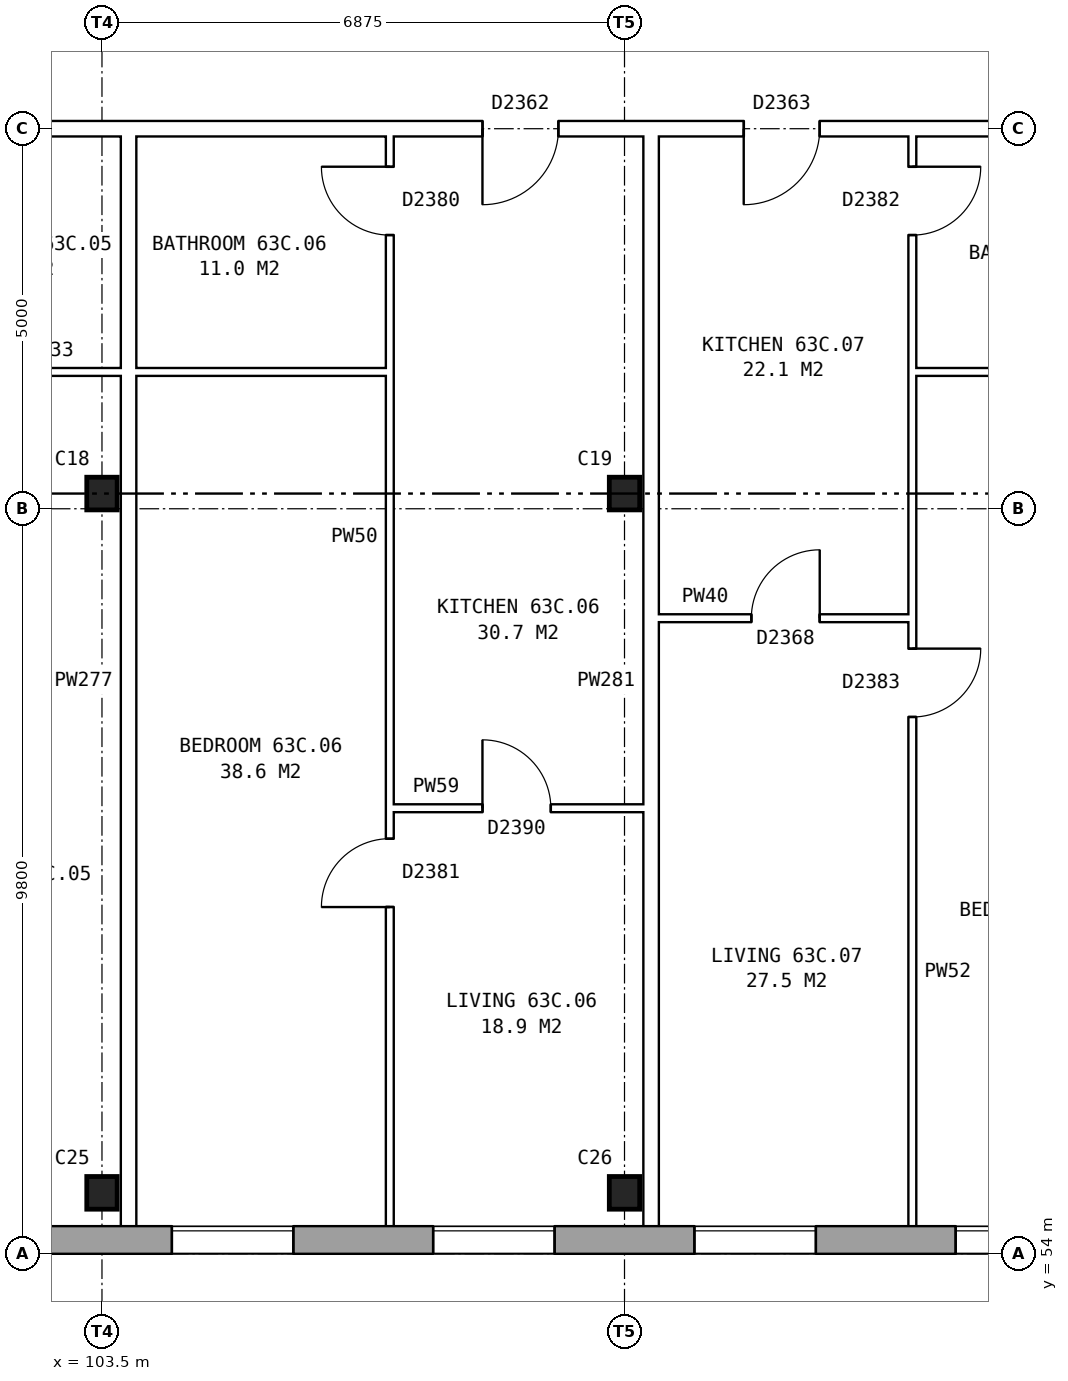
"""IFC4 building model, lengths in metres.
Left out: names, types, materials, properties, quantities, classifications, styles, units other than length and angle.
Written with IfcOpenShell. Run it as: python <this file> out.ifc"""

import sys

from ifc_helpers import new_model, si_unit, direction, frame, frame_2d, origin, origin_2d, place, context, subcontext, project, spatial, rectangle, i_section, extrude, element, fill, save


model = new_model("IFC4")
c1 = context("Model", 3, precision=1e-05, world=origin(), true_north=direction((0.0, 1.0)))
c2 = subcontext(c1, "Body", "Model", "MODEL_VIEW")
j1 = project(units=[si_unit("LENGTHUNIT", "METRE"), si_unit("PLANEANGLEUNIT", "RADIAN")], contexts=[c1])
p1 = place(None, origin())
s1 = spatial("IfcSite", under=j1, at=p1, CompositionType="ELEMENT")
p2 = place(p1, origin())
s2 = spatial("IfcBuilding", under=s1, at=p2, CompositionType="ELEMENT")
p3 = place(p2, frame((0.0, 0.0, 224.5)))
s3 = spatial("IfcBuildingStorey", under=s2, at=p3, CompositionType="ELEMENT", Elevation=224.5)
for number, where, z_axis, x_axis in (
    (1, (103.5, 54.8, 0.0), (0.0, 0.0, 1.0), (1.0, 0.0, 0.0)),
    (2, (110.375, 54.8, 0.0), (0.0, 0.0, 1.0), (1.0, 0.0, 0.0)),
    (3, (103.5, 64.0, 0.0), (0.0, 0.0, 1.0), (1.0, 0.0, 0.0)),
    (4, (110.375, 64.0, 0.0), (0.0, 0.0, 1.0), (1.0, 0.0, 0.0)),
):
    element("IfcColumn", number, at=place(p3, frame(where, z_axis=z_axis, x_axis=x_axis)), inside=s3, PredefinedType="COLUMN", context=c2, shape_type="SweptSolid", body=[
        extrude(i_section(OverallWidth=0.4, OverallDepth=0.43, WebThickness=0.04, FlangeThickness=0.04, at=origin_2d()), origin(), (0.0, 0.0, 1.0), 2.85),
    ])
p4 = place(p3, frame((75.95, 54.18, 0.0), z_axis=(0.0, 0.0, 1.0), x_axis=(1.0, 0.0, 0.0)))
e5 = element("IfcWall", 5, at=p4, inside=s3, PredefinedType="STANDARD", context=c2, shape_type="SweptSolid", body=[
    extrude(rectangle(XDim=55.1, YDim=0.36, at=frame_2d((27.55, 0.0))), origin(), (0.0, 0.0, 1.0), 2.85),
])
p5 = place(p4, frame((0.969, 0.0, 0.8)))
e6 = element("IfcOpeningElement", 6, at=p5, cuts=e5, PredefinedType="OPENING", context=c2, shape_type="SweptSolid", body=[
    extrude(rectangle(XDim=1.6, YDim=1.8, at=frame_2d((0.8, 0.9))), frame((0.0, 0.19, 0.0), z_axis=(0.0, -1.0, 0.0), x_axis=(1.0, 0.0, 0.0)), (0.0, 0.0, 1.0), 0.38),
])
p6 = place(p4, frame((4.406, 0.0, 0.8)))
e7 = element("IfcOpeningElement", 7, at=p6, cuts=e5, PredefinedType="OPENING", context=c2, shape_type="SweptSolid", body=[
    extrude(rectangle(XDim=1.6, YDim=1.8, at=frame_2d((0.8, 0.9))), frame((0.0, 0.19, 0.0), z_axis=(0.0, -1.0, 0.0), x_axis=(1.0, 0.0, 0.0)), (0.0, 0.0, 1.0), 0.38),
])
p7 = place(p4, frame((7.844, 0.0, 0.8)))
e8 = element("IfcOpeningElement", 8, at=p7, cuts=e5, PredefinedType="OPENING", context=c2, shape_type="SweptSolid", body=[
    extrude(rectangle(XDim=1.6, YDim=1.8, at=frame_2d((0.8, 0.9))), frame((0.0, 0.19, 0.0), z_axis=(0.0, -1.0, 0.0), x_axis=(1.0, 0.0, 0.0)), (0.0, 0.0, 1.0), 0.38),
])
p8 = place(p4, frame((11.281, 0.0, 0.8)))
e9 = element("IfcOpeningElement", 9, at=p8, cuts=e5, PredefinedType="OPENING", context=c2, shape_type="SweptSolid", body=[
    extrude(rectangle(XDim=1.6, YDim=1.8, at=frame_2d((0.8, 0.9))), frame((0.0, 0.19, 0.0), z_axis=(0.0, -1.0, 0.0), x_axis=(1.0, 0.0, 0.0)), (0.0, 0.0, 1.0), 0.38),
])
p9 = place(p4, frame((14.719, 0.0, 0.8)))
e10 = element("IfcOpeningElement", 10, at=p9, cuts=e5, PredefinedType="OPENING", context=c2, shape_type="SweptSolid", body=[
    extrude(rectangle(XDim=1.6, YDim=1.8, at=frame_2d((0.8, 0.9))), frame((0.0, 0.19, 0.0), z_axis=(0.0, -1.0, 0.0), x_axis=(1.0, 0.0, 0.0)), (0.0, 0.0, 1.0), 0.38),
])
p10 = place(p4, frame((18.156, 0.0, 0.8)))
e11 = element("IfcOpeningElement", 11, at=p10, cuts=e5, PredefinedType="OPENING", context=c2, shape_type="SweptSolid", body=[
    extrude(rectangle(XDim=1.6, YDim=1.8, at=frame_2d((0.8, 0.9))), frame((0.0, 0.19, 0.0), z_axis=(0.0, -1.0, 0.0), x_axis=(1.0, 0.0, 0.0)), (0.0, 0.0, 1.0), 0.38),
])
p11 = place(p4, frame((21.594, 0.0, 0.8)))
e12 = element("IfcOpeningElement", 12, at=p11, cuts=e5, PredefinedType="OPENING", context=c2, shape_type="SweptSolid", body=[
    extrude(rectangle(XDim=1.6, YDim=1.8, at=frame_2d((0.8, 0.9))), frame((0.0, 0.19, 0.0), z_axis=(0.0, -1.0, 0.0), x_axis=(1.0, 0.0, 0.0)), (0.0, 0.0, 1.0), 0.38),
])
p12 = place(p4, frame((25.031, 0.0, 0.8)))
e13 = element("IfcOpeningElement", 13, at=p12, cuts=e5, PredefinedType="OPENING", context=c2, shape_type="SweptSolid", body=[
    extrude(rectangle(XDim=1.6, YDim=1.8, at=frame_2d((0.8, 0.9))), frame((0.0, 0.19, 0.0), z_axis=(0.0, -1.0, 0.0), x_axis=(1.0, 0.0, 0.0)), (0.0, 0.0, 1.0), 0.38),
])
p13 = place(p4, frame((28.469, 0.0, 0.8)))
e14 = element("IfcOpeningElement", 14, at=p13, cuts=e5, PredefinedType="OPENING", context=c2, shape_type="SweptSolid", body=[
    extrude(rectangle(XDim=1.6, YDim=1.8, at=frame_2d((0.8, 0.9))), frame((0.0, 0.19, 0.0), z_axis=(0.0, -1.0, 0.0), x_axis=(1.0, 0.0, 0.0)), (0.0, 0.0, 1.0), 0.38),
])
p14 = place(p4, frame((31.906, 0.0, 0.8)))
e15 = element("IfcOpeningElement", 15, at=p14, cuts=e5, PredefinedType="OPENING", context=c2, shape_type="SweptSolid", body=[
    extrude(rectangle(XDim=1.6, YDim=1.8, at=frame_2d((0.8, 0.9))), frame((0.0, 0.19, 0.0), z_axis=(0.0, -1.0, 0.0), x_axis=(1.0, 0.0, 0.0)), (0.0, 0.0, 1.0), 0.38),
])
p15 = place(p4, frame((35.344, 0.0, 0.8)))
e16 = element("IfcOpeningElement", 16, at=p15, cuts=e5, PredefinedType="OPENING", context=c2, shape_type="SweptSolid", body=[
    extrude(rectangle(XDim=1.6, YDim=1.8, at=frame_2d((0.8, 0.9))), frame((0.0, 0.19, 0.0), z_axis=(0.0, -1.0, 0.0), x_axis=(1.0, 0.0, 0.0)), (0.0, 0.0, 1.0), 0.38),
])
p16 = place(p4, frame((38.781, 0.0, 0.8)))
e17 = element("IfcOpeningElement", 17, at=p16, cuts=e5, PredefinedType="OPENING", context=c2, shape_type="SweptSolid", body=[
    extrude(rectangle(XDim=1.6, YDim=1.8, at=frame_2d((0.8, 0.9))), frame((0.0, 0.19, 0.0), z_axis=(0.0, -1.0, 0.0), x_axis=(1.0, 0.0, 0.0)), (0.0, 0.0, 1.0), 0.38),
])
p17 = place(p4, frame((42.219, 0.0, 0.8)))
e18 = element("IfcOpeningElement", 18, at=p17, cuts=e5, PredefinedType="OPENING", context=c2, shape_type="SweptSolid", body=[
    extrude(rectangle(XDim=1.6, YDim=1.8, at=frame_2d((0.8, 0.9))), frame((0.0, 0.19, 0.0), z_axis=(0.0, -1.0, 0.0), x_axis=(1.0, 0.0, 0.0)), (0.0, 0.0, 1.0), 0.38),
])
p18 = place(p4, frame((45.656, 0.0, 0.8)))
e19 = element("IfcOpeningElement", 19, at=p18, cuts=e5, PredefinedType="OPENING", context=c2, shape_type="SweptSolid", body=[
    extrude(rectangle(XDim=1.6, YDim=1.8, at=frame_2d((0.8, 0.9))), frame((0.0, 0.19, 0.0), z_axis=(0.0, -1.0, 0.0), x_axis=(1.0, 0.0, 0.0)), (0.0, 0.0, 1.0), 0.38),
])
p19 = place(p4, frame((49.094, 0.0, 0.8)))
e20 = element("IfcOpeningElement", 20, at=p19, cuts=e5, PredefinedType="OPENING", context=c2, shape_type="SweptSolid", body=[
    extrude(rectangle(XDim=1.6, YDim=1.8, at=frame_2d((0.8, 0.9))), frame((0.0, 0.19, 0.0), z_axis=(0.0, -1.0, 0.0), x_axis=(1.0, 0.0, 0.0)), (0.0, 0.0, 1.0), 0.38),
])
p20 = place(p4, frame((52.531, 0.0, 0.8)))
e21 = element("IfcOpeningElement", 21, at=p20, cuts=e5, PredefinedType="OPENING", context=c2, shape_type="SweptSolid", body=[
    extrude(rectangle(XDim=1.6, YDim=1.8, at=frame_2d((0.8, 0.9))), frame((0.0, 0.19, 0.0), z_axis=(0.0, -1.0, 0.0), x_axis=(1.0, 0.0, 0.0)), (0.0, 0.0, 1.0), 0.38),
])
p21 = place(p3, frame((107.287, 59.86, 0.0), z_axis=(0.0, 0.0, 1.0), x_axis=(1.0, 0.0, 0.0)))
e22 = element("IfcWall", 22, at=p21, inside=s3, PredefinedType="PARTITIONING", context=c2, shape_type="SweptSolid", body=[
    extrude(rectangle(XDim=3.338, YDim=0.1, at=frame_2d((1.669, 0.0))), origin(), (0.0, 0.0, 1.0), 2.85),
])
p22 = place(p21, frame((1.219, 0.0, 0.0)))
e23 = element("IfcOpeningElement", 23, at=p22, cuts=e22, PredefinedType="OPENING", context=c2, shape_type="SweptSolid", body=[
    extrude(rectangle(XDim=0.9, YDim=2.1, at=frame_2d((0.45, 1.05))), frame((0.0, 0.06, 0.0), z_axis=(0.0, -1.0, 0.0), x_axis=(1.0, 0.0, 0.0)), (0.0, 0.0, 1.0), 0.12),
])
p23 = place(p3, frame((110.825, 62.36, 0.0), z_axis=(0.0, 0.0, 1.0), x_axis=(1.0, 0.0, 0.0)))
e24 = element("IfcWall", 24, at=p23, inside=s3, PredefinedType="PARTITIONING", context=c2, shape_type="SweptSolid", body=[
    extrude(rectangle(XDim=3.337, YDim=0.1, at=frame_2d((1.668, 0.0))), origin(), (0.0, 0.0, 1.0), 2.85),
])
p24 = place(p23, frame((1.219, 0.0, 0.0)))
e25 = element("IfcOpeningElement", 25, at=p24, cuts=e24, PredefinedType="OPENING", context=c2, shape_type="SweptSolid", body=[
    extrude(rectangle(XDim=0.9, YDim=2.1, at=frame_2d((0.45, 1.05))), frame((0.0, 0.06, 0.0), z_axis=(0.0, -1.0, 0.0), x_axis=(1.0, 0.0, 0.0)), (0.0, 0.0, 1.0), 0.12),
])
p25 = place(p3, frame((100.412, 65.6, 0.0), z_axis=(0.0, 0.0, 1.0), x_axis=(1.0, 0.0, 0.0)))
e26 = element("IfcWall", 26, at=p25, inside=s3, PredefinedType="PARTITIONING", context=c2, shape_type="SweptSolid", body=[
    extrude(rectangle(XDim=6.875, YDim=0.1, at=frame_2d((3.438, 0.0))), origin(), (0.0, 0.0, 1.0), 2.85),
])
p26 = place(p3, frame((114.162, 65.6, 0.0), z_axis=(0.0, 0.0, 1.0), x_axis=(1.0, 0.0, 0.0)))
e27 = element("IfcWall", 27, at=p26, inside=s3, PredefinedType="PARTITIONING", context=c2, shape_type="SweptSolid", body=[
    extrude(rectangle(XDim=3.338, YDim=0.1, at=frame_2d((1.669, 0.0))), origin(), (0.0, 0.0, 1.0), 2.85),
])
p27 = place(p3, frame((75.64, 68.8, 0.0), z_axis=(0.0, 0.0, 1.0), x_axis=(1.0, 0.0, 0.0)))
e28 = element("IfcWall", 28, at=p27, inside=s3, PredefinedType="PARTITIONING", context=c2, shape_type="SweptSolid", body=[
    extrude(rectangle(XDim=55.72, YDim=0.2, at=frame_2d((27.86, 0.0))), origin(), (0.0, 0.0, 1.0), 2.85),
])
p28 = place(p27, frame((1.399, 0.0, 0.0)))
e29 = element("IfcOpeningElement", 29, at=p28, cuts=e28, PredefinedType="OPENING", context=c2, shape_type="SweptSolid", body=[
    extrude(rectangle(XDim=1.0, YDim=2.1, at=frame_2d((0.5, 1.05))), frame((0.0, 0.11, 0.0), z_axis=(0.0, -1.0, 0.0), x_axis=(1.0, 0.0, 0.0)), (0.0, 0.0, 1.0), 0.22),
])
p29 = place(p27, frame((12.241, 0.0, 0.0)))
e30 = element("IfcOpeningElement", 30, at=p29, cuts=e28, PredefinedType="OPENING", context=c2, shape_type="SweptSolid", body=[
    extrude(rectangle(XDim=1.0, YDim=2.1, at=frame_2d((0.5, 1.05))), frame((0.0, 0.11, 0.0), z_axis=(0.0, -1.0, 0.0), x_axis=(1.0, 0.0, 0.0)), (0.0, 0.0, 1.0), 0.22),
])
p30 = place(p27, frame((22.553, 0.0, 0.0)))
e31 = element("IfcOpeningElement", 31, at=p30, cuts=e28, PredefinedType="OPENING", context=c2, shape_type="SweptSolid", body=[
    extrude(rectangle(XDim=1.0, YDim=2.1, at=frame_2d((0.5, 1.05))), frame((0.0, 0.11, 0.0), z_axis=(0.0, -1.0, 0.0), x_axis=(1.0, 0.0, 0.0)), (0.0, 0.0, 1.0), 0.22),
])
p31 = place(p27, frame((32.866, 0.0, 0.0)))
e32 = element("IfcOpeningElement", 32, at=p31, cuts=e28, PredefinedType="OPENING", context=c2, shape_type="SweptSolid", body=[
    extrude(rectangle(XDim=1.0, YDim=2.1, at=frame_2d((0.5, 1.05))), frame((0.0, 0.11, 0.0), z_axis=(0.0, -1.0, 0.0), x_axis=(1.0, 0.0, 0.0)), (0.0, 0.0, 1.0), 0.22),
])
p32 = place(p27, frame((36.303, 0.0, 0.0)))
e33 = element("IfcOpeningElement", 33, at=p32, cuts=e28, PredefinedType="OPENING", context=c2, shape_type="SweptSolid", body=[
    extrude(rectangle(XDim=1.0, YDim=2.1, at=frame_2d((0.5, 1.05))), frame((0.0, 0.11, 0.0), z_axis=(0.0, -1.0, 0.0), x_axis=(1.0, 0.0, 0.0)), (0.0, 0.0, 1.0), 0.22),
])
p33 = place(p27, frame((46.616, 0.0, 0.0)))
e34 = element("IfcOpeningElement", 34, at=p33, cuts=e28, PredefinedType="OPENING", context=c2, shape_type="SweptSolid", body=[
    extrude(rectangle(XDim=1.0, YDim=2.1, at=frame_2d((0.5, 1.05))), frame((0.0, 0.11, 0.0), z_axis=(0.0, -1.0, 0.0), x_axis=(1.0, 0.0, 0.0)), (0.0, 0.0, 1.0), 0.22),
])
p34 = place(p27, frame((50.053, 0.0, 0.0)))
e35 = element("IfcOpeningElement", 35, at=p34, cuts=e28, PredefinedType="OPENING", context=c2, shape_type="SweptSolid", body=[
    extrude(rectangle(XDim=1.0, YDim=2.1, at=frame_2d((0.5, 1.05))), frame((0.0, 0.11, 0.0), z_axis=(0.0, -1.0, 0.0), x_axis=(1.0, 0.0, 0.0)), (0.0, 0.0, 1.0), 0.22),
])
p35 = place(p3, frame((103.85, 54.36, 0.0), z_axis=(0.0, 0.0, 1.0), x_axis=(0.0, 1.0, 0.0)))
e36 = element("IfcWall", 36, at=p35, inside=s3, PredefinedType="PARTITIONING", context=c2, shape_type="SweptSolid", body=[
    extrude(rectangle(XDim=14.34, YDim=0.2, at=frame_2d((7.17, 0.0))), origin(), (0.0, 0.0, 1.0), 2.85),
])
p36 = place(p3, frame((107.287, 54.36, 0.0), z_axis=(0.0, 0.0, 1.0), x_axis=(0.0, 1.0, 0.0)))
e37 = element("IfcWall", 37, at=p36, inside=s3, PredefinedType="PARTITIONING", context=c2, shape_type="SweptSolid", body=[
    extrude(rectangle(XDim=14.34, YDim=0.1, at=frame_2d((7.17, 0.0))), origin(), (0.0, 0.0, 1.0), 2.85),
])
p37 = place(p36, frame((4.2, 0.0, 0.0)))
e38 = element("IfcOpeningElement", 38, at=p37, cuts=e37, PredefinedType="OPENING", context=c2, shape_type="SweptSolid", body=[
    extrude(rectangle(XDim=0.9, YDim=2.1, at=frame_2d((0.45, 1.05))), frame((0.0, 0.06, 0.0), z_axis=(0.0, -1.0, 0.0), x_axis=(1.0, 0.0, 0.0)), (0.0, 0.0, 1.0), 0.12),
])
p38 = place(p36, frame((13.04, 0.0, 0.0)))
e39 = element("IfcOpeningElement", 39, at=p38, cuts=e37, PredefinedType="OPENING", context=c2, shape_type="SweptSolid", body=[
    extrude(rectangle(XDim=0.9, YDim=2.1, at=frame_2d((0.45, 1.05))), frame((0.0, 0.06, 0.0), z_axis=(0.0, -1.0, 0.0), x_axis=(1.0, 0.0, 0.0)), (0.0, 0.0, 1.0), 0.12),
])
p39 = place(p3, frame((110.725, 54.36, 0.0), z_axis=(0.0, 0.0, 1.0), x_axis=(0.0, 1.0, 0.0)))
e40 = element("IfcWall", 40, at=p39, inside=s3, PredefinedType="PARTITIONING", context=c2, shape_type="SweptSolid", body=[
    extrude(rectangle(XDim=14.34, YDim=0.2, at=frame_2d((7.17, 0.0))), origin(), (0.0, 0.0, 1.0), 2.85),
])
p40 = place(p3, frame((114.162, 54.36, 0.0), z_axis=(0.0, 0.0, 1.0), x_axis=(0.0, 1.0, 0.0)))
e41 = element("IfcWall", 41, at=p40, inside=s3, PredefinedType="PARTITIONING", context=c2, shape_type="SweptSolid", body=[
    extrude(rectangle(XDim=14.34, YDim=0.1, at=frame_2d((7.17, 0.0))), origin(), (0.0, 0.0, 1.0), 2.85),
])
p41 = place(p40, frame((6.7, 0.0, 0.0)))
e42 = element("IfcOpeningElement", 42, at=p41, cuts=e41, PredefinedType="OPENING", context=c2, shape_type="SweptSolid", body=[
    extrude(rectangle(XDim=0.9, YDim=2.1, at=frame_2d((0.45, 1.05))), frame((0.0, 0.06, 0.0), z_axis=(0.0, -1.0, 0.0), x_axis=(1.0, 0.0, 0.0)), (0.0, 0.0, 1.0), 0.12),
])
p42 = place(p40, frame((13.04, 0.0, 0.0)))
e43 = element("IfcOpeningElement", 43, at=p42, cuts=e41, PredefinedType="OPENING", context=c2, shape_type="SweptSolid", body=[
    extrude(rectangle(XDim=0.9, YDim=2.1, at=frame_2d((0.45, 1.05))), frame((0.0, 0.06, 0.0), z_axis=(0.0, -1.0, 0.0), x_axis=(1.0, 0.0, 0.0)), (0.0, 0.0, 1.0), 0.12),
])
p43 = place(p13, origin())
e44 = element("IfcWindow", 44, at=p43, inside=s3, PartitioningType="SINGLE_PANEL", PredefinedType="WINDOW", context=c2, shape_type="SweptSolid", body=[
    extrude(rectangle(XDim=1.6, YDim=1.8, at=frame_2d((0.8, 0.9))), frame((0.0, 0.15, 0.0), z_axis=(0.0, -1.0, 0.0), x_axis=(1.0, 0.0, 0.0)), (0.0, 0.0, 1.0), 0.06),
])
fill(e14, e44)
p44 = place(p14, origin())
e45 = element("IfcWindow", 45, at=p44, inside=s3, PartitioningType="SINGLE_PANEL", PredefinedType="WINDOW", context=c2, shape_type="SweptSolid", body=[
    extrude(rectangle(XDim=1.6, YDim=1.8, at=frame_2d((0.8, 0.9))), frame((0.0, 0.15, 0.0), z_axis=(0.0, -1.0, 0.0), x_axis=(1.0, 0.0, 0.0)), (0.0, 0.0, 1.0), 0.06),
])
fill(e15, e45)
p45 = place(p15, origin())
e46 = element("IfcWindow", 46, at=p45, inside=s3, PartitioningType="SINGLE_PANEL", PredefinedType="WINDOW", context=c2, shape_type="SweptSolid", body=[
    extrude(rectangle(XDim=1.6, YDim=1.8, at=frame_2d((0.8, 0.9))), frame((0.0, 0.15, 0.0), z_axis=(0.0, -1.0, 0.0), x_axis=(1.0, 0.0, 0.0)), (0.0, 0.0, 1.0), 0.06),
])
fill(e16, e46)
p46 = place(p16, origin())
e47 = element("IfcWindow", 47, at=p46, inside=s3, PartitioningType="SINGLE_PANEL", PredefinedType="WINDOW", context=c2, shape_type="SweptSolid", body=[
    extrude(rectangle(XDim=1.6, YDim=1.8, at=frame_2d((0.8, 0.9))), frame((0.0, 0.15, 0.0), z_axis=(0.0, -1.0, 0.0), x_axis=(1.0, 0.0, 0.0)), (0.0, 0.0, 1.0), 0.06),
])
fill(e17, e47)
p47 = place(p37, origin())
e48 = element("IfcDoor", 48, at=p47, inside=s3, OperationType="SINGLE_SWING_LEFT", PredefinedType="DOOR", context=c2, shape_type="SweptSolid", body=[
    extrude(rectangle(XDim=0.9, YDim=2.1, at=frame_2d((0.45, 1.05))), frame((0.0, 0.025, 0.0), z_axis=(0.0, -1.0, 0.0), x_axis=(1.0, 0.0, 0.0)), (0.0, 0.0, 1.0), 0.05),
])
fill(e38, e48)
p48 = place(p31, frame((1.0, 0.0, 0.0), z_axis=(0.0, 0.0, 1.0), x_axis=(-1.0, 0.0, 0.0)))
e49 = element("IfcDoor", 49, at=p48, inside=s3, OperationType="SINGLE_SWING_RIGHT", PredefinedType="DOOR", context=c2, shape_type="SweptSolid", body=[
    extrude(rectangle(XDim=1.0, YDim=2.1, at=frame_2d((0.5, 1.05))), frame((0.0, 0.025, 0.0), z_axis=(0.0, -1.0, 0.0), x_axis=(1.0, 0.0, 0.0)), (0.0, 0.0, 1.0), 0.05),
])
fill(e32, e49)
p49 = place(p22, origin())
e50 = element("IfcDoor", 50, at=p49, inside=s3, OperationType="SINGLE_SWING_LEFT", PredefinedType="DOOR", context=c2, shape_type="SweptSolid", body=[
    extrude(rectangle(XDim=0.9, YDim=2.1, at=frame_2d((0.45, 1.05))), frame((0.0, 0.025, 0.0), z_axis=(0.0, -1.0, 0.0), x_axis=(1.0, 0.0, 0.0)), (0.0, 0.0, 1.0), 0.05),
])
fill(e23, e50)
p50 = place(p38, origin())
e51 = element("IfcDoor", 51, at=p50, inside=s3, OperationType="SINGLE_SWING_RIGHT", PredefinedType="DOOR", context=c2, shape_type="SweptSolid", body=[
    extrude(rectangle(XDim=0.9, YDim=2.1, at=frame_2d((0.45, 1.05))), frame((0.0, 0.025, 0.0), z_axis=(0.0, -1.0, 0.0), x_axis=(1.0, 0.0, 0.0)), (0.0, 0.0, 1.0), 0.05),
])
fill(e39, e51)
p51 = place(p41, frame((0.9, 0.0, 0.0), z_axis=(0.0, 0.0, 1.0), x_axis=(-1.0, 0.0, 0.0)))
e52 = element("IfcDoor", 52, at=p51, inside=s3, OperationType="SINGLE_SWING_LEFT", PredefinedType="DOOR", context=c2, shape_type="SweptSolid", body=[
    extrude(rectangle(XDim=0.9, YDim=2.1, at=frame_2d((0.45, 1.05))), frame((0.0, 0.025, 0.0), z_axis=(0.0, -1.0, 0.0), x_axis=(1.0, 0.0, 0.0)), (0.0, 0.0, 1.0), 0.05),
])
fill(e42, e52)
p52 = place(p32, frame((1.0, 0.0, 0.0), z_axis=(0.0, 0.0, 1.0), x_axis=(-1.0, 0.0, 0.0)))
e53 = element("IfcDoor", 53, at=p52, inside=s3, OperationType="SINGLE_SWING_RIGHT", PredefinedType="DOOR", context=c2, shape_type="SweptSolid", body=[
    extrude(rectangle(XDim=1.0, YDim=2.1, at=frame_2d((0.5, 1.05))), frame((0.0, 0.025, 0.0), z_axis=(0.0, -1.0, 0.0), x_axis=(1.0, 0.0, 0.0)), (0.0, 0.0, 1.0), 0.05),
])
fill(e33, e53)
p53 = place(p24, origin())
e54 = element("IfcDoor", 54, at=p53, inside=s3, OperationType="SINGLE_SWING_RIGHT", PredefinedType="DOOR", context=c2, shape_type="SweptSolid", body=[
    extrude(rectangle(XDim=0.9, YDim=2.1, at=frame_2d((0.45, 1.05))), frame((0.0, 0.025, 0.0), z_axis=(0.0, -1.0, 0.0), x_axis=(1.0, 0.0, 0.0)), (0.0, 0.0, 1.0), 0.05),
])
fill(e25, e54)
p54 = place(p42, frame((0.9, 0.0, 0.0), z_axis=(0.0, 0.0, 1.0), x_axis=(-1.0, 0.0, 0.0)))
e55 = element("IfcDoor", 55, at=p54, inside=s3, OperationType="SINGLE_SWING_LEFT", PredefinedType="DOOR", context=c2, shape_type="SweptSolid", body=[
    extrude(rectangle(XDim=0.9, YDim=2.1, at=frame_2d((0.45, 1.05))), frame((0.0, 0.025, 0.0), z_axis=(0.0, -1.0, 0.0), x_axis=(1.0, 0.0, 0.0)), (0.0, 0.0, 1.0), 0.05),
])
fill(e43, e55)
save(model, sys.argv[1])
